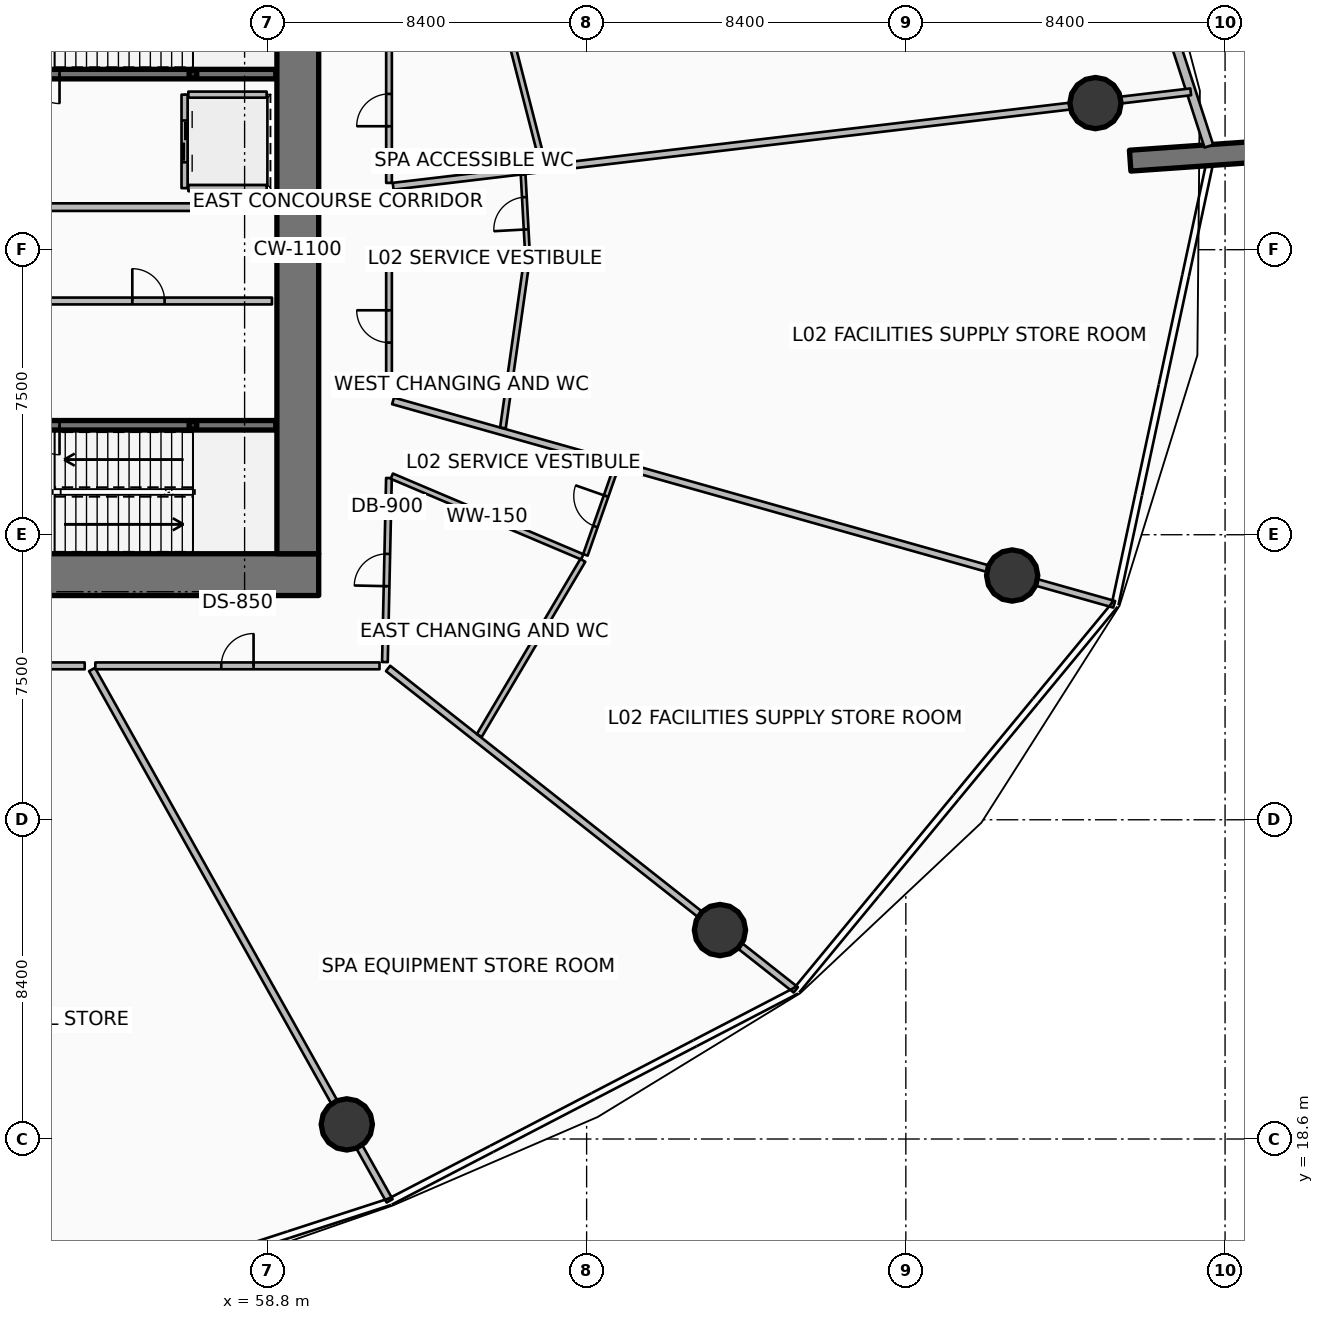
"""IFC4 building model, lengths in metres.
Left out: names, types, materials, properties, quantities, classifications, styles, units other than length and angle.
Written with IfcOpenShell. Run it as: python <this file> out.ifc"""

import sys

from ifc_helpers import new_model, si_unit, direction, frame, frame_2d, origin, origin_2d, place, context, subcontext, project, spatial, rectangle, hollow_rectangle, circle, extrude, element, fill, save


model = new_model("IFC4")
c1 = context("Model", 3, precision=1e-05, world=origin(), true_north=direction((0.0, 1.0)))
c2 = subcontext(c1, "Body", "Model", "MODEL_VIEW")
j1 = project(units=[si_unit("LENGTHUNIT", "METRE"), si_unit("PLANEANGLEUNIT", "RADIAN")], contexts=[c1])
p1 = place(None, origin())
s1 = spatial("IfcSite", under=j1, at=p1, CompositionType="ELEMENT")
p2 = place(p1, origin())
s2 = spatial("IfcBuilding", under=s1, at=p2, CompositionType="ELEMENT")
p3 = place(p2, frame((0.0, 0.0, 12.0)))
s3 = spatial("IfcBuildingStorey", under=s2, at=p3, CompositionType="ELEMENT", Elevation=12.0)
p4 = place(p3, frame((49.95, 33.45, 0.0), z_axis=(0.0, 0.0, 1.0), x_axis=(1.0, 0.0, 0.0)))
e1 = element("IfcWall", 1, at=p4, inside=s3, PredefinedType="SHEAR", context=c2, shape_type="SweptSolid", body=[
    extrude(rectangle(XDim=10.2, YDim=1.1, at=frame_2d((5.1, 0.0))), origin(), (0.0, 0.0, 1.0), 4.8),
])
p5 = place(p3, frame((59.6, 34.0, 0.0), z_axis=(0.0, 0.0, 1.0), x_axis=(0.0, 1.0, 0.0)))
e2 = element("IfcWall", 2, at=p5, inside=s3, PredefinedType="SHEAR", context=c2, shape_type="SweptSolid", body=[
    extrude(rectangle(XDim=16.0, YDim=1.1, at=frame_2d((8.0, 0.0))), origin(), (0.0, 0.0, 1.0), 4.8),
])
for number, where, z_axis, x_axis in (
    (3, (56.84, 46.62, 0.0), (0.0, 0.0, 1.0), (1.0, 0.0, 0.0)),
    (4, (56.84, 37.38, 0.0), (0.0, 0.0, 1.0), (1.0, 0.0, 0.0)),
):
    element("IfcColumn", number, at=place(p3, frame(where, z_axis=z_axis, x_axis=x_axis)), inside=s3, PredefinedType="COLUMN", context=c2, shape_type="SweptSolid", body=[
        extrude(hollow_rectangle(XDim=0.2, YDim=0.2, WallThickness=0.01, InnerFilletRadius=0.01, OuterFilletRadius=0.02, at=origin_2d()), origin(), (0.0, 0.0, 1.0), 2.195),
    ])
p6 = place(p3, frame((81.503, 44.343, 0.0), z_axis=(0.0, 0.0, 1.0), x_axis=(0.997564163539, 0.069754853754, 0.0)))
e5 = element("IfcWall", 5, at=p6, inside=s3, PredefinedType="SOLIDWALL", context=c2, shape_type="SweptSolid", body=[
    extrude(rectangle(XDim=3.5, YDim=0.55, at=frame_2d((1.75, 0.0))), origin(), (0.0, 0.0, 1.0), 4.8),
])
for number, where, z_axis, x_axis in (
    (6, (60.889, 18.984, 0.0), (0.0, 0.0, 1.0), (1.0, 0.0, 0.0)),
    (7, (70.709, 24.098, 0.0), (0.0, 0.0, 1.0), (1.0, 0.0, 0.0)),
    (8, (78.398, 33.427, 0.0), (0.0, 0.0, 1.0), (1.0, 0.0, 0.0)),
    (9, (80.59, 45.857, 0.0), (0.0, 0.0, 1.0), (1.0, 0.0, 0.0)),
):
    element("IfcColumn", number, at=place(p3, frame(where, z_axis=z_axis, x_axis=x_axis)), inside=s3, PredefinedType="COLUMN", context=c2, shape_type="SweptSolid", body=[
        extrude(circle(Radius=0.675, at=origin_2d()), origin(), (0.0, 0.0, 1.0), 4.48),
    ])
p7 = place(p3, frame((83.573, 44.725, 0.0), z_axis=(0.0, 0.0, 1.0), x_axis=(-0.309022005354, 0.951054888115, 0.0)))
e10 = element("IfcWall", 10, at=p7, inside=s3, PredefinedType="SOLIDWALL", context=c2, shape_type="SweptSolid", body=[
    extrude(rectangle(XDim=16.803, YDim=0.24, at=frame_2d((8.401, 0.0))), origin(), (0.0, 0.0, 1.0), 3.43),
])
p8 = place(p7, frame((7.201, 0.0, 0.85)))
e11 = element("IfcOpeningElement", 11, at=p8, cuts=e10, PredefinedType="OPENING", context=c2, shape_type="SweptSolid", body=[
    extrude(rectangle(XDim=2.4, YDim=2.1, at=frame_2d((1.2, 1.05))), frame((0.0, 0.13, 0.0), z_axis=(0.0, -1.0, 0.0), x_axis=(1.0, 0.0, 0.0)), (0.0, 0.0, 1.0), 0.26),
])
p9 = place(p3, frame((51.48, 46.62, 0.0), z_axis=(0.0, 0.0, 1.0), x_axis=(1.0, 0.0, 0.0)))
e12 = element("IfcWall", 12, at=p9, inside=s3, PredefinedType="SOLIDWALL", context=c2, shape_type="SweptSolid", body=[
    extrude(rectangle(XDim=7.54, YDim=0.25, at=frame_2d((3.77, 0.0))), origin(), (0.0, 0.0, 1.0), 4.48),
])
p10 = place(p9, frame((0.3, 0.0, 0.0)))
e13 = element("IfcOpeningElement", 13, at=p10, cuts=e12, PredefinedType="OPENING", context=c2, shape_type="SweptSolid", body=[
    extrude(rectangle(XDim=1.55, YDim=2.15, at=frame_2d((0.775, 1.075))), frame((0.0, 0.135, 0.0), z_axis=(0.0, -1.0, 0.0), x_axis=(1.0, 0.0, 0.0)), (0.0, 0.0, 1.0), 0.27),
])
p11 = place(p3, frame((51.48, 37.38, 0.0), z_axis=(0.0, 0.0, 1.0), x_axis=(1.0, 0.0, 0.0)))
e14 = element("IfcWall", 14, at=p11, inside=s3, PredefinedType="SOLIDWALL", context=c2, shape_type="SweptSolid", body=[
    extrude(rectangle(XDim=7.54, YDim=0.25, at=frame_2d((3.77, 0.0))), origin(), (0.0, 0.0, 1.0), 4.48),
])
p12 = place(p11, frame((0.3, 0.0, 0.0)))
e15 = element("IfcOpeningElement", 15, at=p12, cuts=e14, PredefinedType="OPENING", context=c2, shape_type="SweptSolid", body=[
    extrude(rectangle(XDim=1.55, YDim=2.15, at=frame_2d((0.775, 1.075))), frame((0.0, 0.135, 0.0), z_axis=(0.0, -1.0, 0.0), x_axis=(1.0, 0.0, 0.0)), (0.0, 0.0, 1.0), 0.27),
])
p13 = place(p3, frame((56.62, 46.08, 0.0), z_axis=(0.0, 0.0, 1.0), x_axis=(0.0, -1.0, 0.0)))
e16 = element("IfcWall", 16, at=p13, inside=s3, PredefinedType="PARTITIONING", context=c2, shape_type="SweptSolid", body=[
    extrude(rectangle(XDim=2.46, YDim=0.16, at=frame_2d((1.23, 0.0))), origin(), (0.0, 0.0, 1.0), 4.48),
])
p14 = place(p13, frame((0.68, 0.0, 0.0)))
e17 = element("IfcOpeningElement", 17, at=p14, cuts=e16, PredefinedType="OPENING", context=c2, shape_type="SweptSolid", body=[
    extrude(rectangle(XDim=1.1, YDim=2.1, at=frame_2d((0.55, 1.05))), frame((0.0, 0.09, 0.0), z_axis=(0.0, -1.0, 0.0), x_axis=(1.0, 0.0, 0.0)), (0.0, 0.0, 1.0), 0.18),
])
for number, where, z_axis, x_axis in (
    (18, (56.72, 46.08, 0.0), (0.0, 0.0, 1.0), (1.0, 0.0, 0.0)),
    (19, (56.72, 43.62, 0.0), (0.0, 0.0, 1.0), (1.0, 0.0, 0.0)),
):
    element("IfcWall", number, at=place(p3, frame(where, z_axis=z_axis, x_axis=x_axis)), inside=s3, PredefinedType="PARTITIONING", context=c2, shape_type="SweptSolid", body=[
        extrude(rectangle(XDim=2.06, YDim=0.16, at=frame_2d((1.03, 0.0))), origin(), (0.0, 0.0, 1.0), 4.48),
    ])
p15 = place(p3, frame((52.42, 40.65, 0.0), z_axis=(0.0, 0.0, 1.0), x_axis=(1.0, 0.0, 0.0)))
e20 = element("IfcWall", 20, at=p15, inside=s3, PredefinedType="PARTITIONING", context=c2, shape_type="SweptSolid", body=[
    extrude(rectangle(XDim=6.5, YDim=0.18, at=frame_2d((3.25, 0.0))), origin(), (0.0, 0.0, 1.0), 4.48),
])
p16 = place(p15, frame((2.825, 0.0, 0.0)))
e21 = element("IfcOpeningElement", 21, at=p16, cuts=e20, PredefinedType="OPENING", context=c2, shape_type="SweptSolid", body=[
    extrude(rectangle(XDim=0.85, YDim=2.06, at=frame_2d((0.425, 1.03))), frame((0.0, 0.1, 0.0), z_axis=(0.0, -1.0, 0.0), x_axis=(1.0, 0.0, 0.0)), (0.0, 0.0, 1.0), 0.2),
])
p17 = place(p3, frame((50.12, 43.12, 0.0), z_axis=(0.0, 0.0, 1.0), x_axis=(1.0, 0.0, 0.0)))
e22 = element("IfcWall", 22, at=p17, inside=s3, PredefinedType="PARTITIONING", context=c2, shape_type="SweptSolid", body=[
    extrude(rectangle(XDim=8.88, YDim=0.2, at=frame_2d((4.44, 0.0))), origin(), (0.0, 0.0, 1.0), 4.48),
])
p18 = place(p3, frame((49.436, 31.05, 0.0), z_axis=(0.0, 0.0, 1.0), x_axis=(1.0, 0.0, 0.0)))
e23 = element("IfcWall", 23, at=p18, inside=s3, PredefinedType="PARTITIONING", context=c2, shape_type="SweptSolid", body=[
    extrude(rectangle(XDim=4.556, YDim=0.18, at=frame_2d((2.278, 0.0))), origin(), (0.0, 0.0, 1.0), 3.693),
])
p19 = place(p18, frame((1.753, 0.0, 0.0)))
e24 = element("IfcOpeningElement", 24, at=p19, cuts=e23, PredefinedType="OPENING", context=c2, shape_type="SweptSolid", body=[
    extrude(rectangle(XDim=1.05, YDim=2.1, at=frame_2d((0.525, 1.05))), frame((0.0, 0.1, 0.0), z_axis=(0.0, -1.0, 0.0), x_axis=(1.0, 0.0, 0.0)), (0.0, 0.0, 1.0), 0.2),
])
p20 = place(p3, frame((54.186, 30.954, 0.0), z_axis=(0.0, 0.0, 1.0), x_axis=(0.48862053439, -0.872496403071, 0.0)))
e25 = element("IfcWall", 25, at=p20, inside=s3, PredefinedType="PARTITIONING", context=c2, shape_type="SweptSolid", body=[
    extrude(rectangle(XDim=16.024, YDim=0.18, at=frame_2d((8.012, 0.0))), origin(), (0.0, 0.0, 1.0), 3.693),
])
p21 = place(p3, frame((54.272, 31.05, 0.0), z_axis=(0.0, 0.0, 1.0), x_axis=(1.0, 0.0, 0.0)))
e26 = element("IfcWall", 26, at=p21, inside=s3, PredefinedType="PARTITIONING", context=c2, shape_type="SweptSolid", body=[
    extrude(rectangle(XDim=7.478, YDim=0.18, at=frame_2d((3.739, 0.0))), origin(), (0.0, 0.0, 1.0), 3.693),
])
p22 = place(p21, frame((3.314, 0.0, 0.0)))
e27 = element("IfcOpeningElement", 27, at=p22, cuts=e26, PredefinedType="OPENING", context=c2, shape_type="SweptSolid", body=[
    extrude(rectangle(XDim=0.85, YDim=2.06, at=frame_2d((0.425, 1.03))), frame((0.0, 0.1, 0.0), z_axis=(0.0, -1.0, 0.0), x_axis=(1.0, 0.0, 0.0)), (0.0, 0.0, 1.0), 0.2),
])
p23 = place(p3, frame((61.976, 30.982, 0.0), z_axis=(0.0, 0.0, 1.0), x_axis=(0.785315783489, -0.619095404766, 0.0)))
e28 = element("IfcWall", 28, at=p23, inside=s3, PredefinedType="PARTITIONING", context=c2, shape_type="SweptSolid", body=[
    extrude(rectangle(XDim=13.661, YDim=0.18, at=frame_2d((6.831, 0.0))), origin(), (0.0, 0.0, 1.0), 3.693),
])
p24 = place(p3, frame((61.892, 31.15, 0.0), z_axis=(0.0, 0.0, 1.0), x_axis=(0.021928973177, 0.999759531155, 0.0)))
e29 = element("IfcWall", 29, at=p24, inside=s3, PredefinedType="PARTITIONING", context=c2, shape_type="SweptSolid", body=[
    extrude(rectangle(XDim=4.843, YDim=0.15, at=frame_2d((2.421, 0.0))), origin(), (0.0, 0.0, 1.0), 3.693),
])
p25 = place(p24, frame((1.997, 0.0, 0.0)))
e30 = element("IfcOpeningElement", 30, at=p25, cuts=e29, PredefinedType="OPENING", context=c2, shape_type="SweptSolid", body=[
    extrude(rectangle(XDim=0.85, YDim=2.06, at=frame_2d((0.425, 1.03))), frame((0.0, 0.085, 0.0), z_axis=(0.0, -1.0, 0.0), x_axis=(1.0, 0.0, 0.0)), (0.0, 0.0, 1.0), 0.17),
])
p26 = place(p3, frame((62.074, 36.041, 0.0), z_axis=(0.0, 0.0, 1.0), x_axis=(0.920841540816, -0.38993699069, 0.0)))
e31 = element("IfcWall", 31, at=p26, inside=s3, PredefinedType="PARTITIONING", context=c2, shape_type="SweptSolid", body=[
    extrude(rectangle(XDim=5.443, YDim=0.15, at=frame_2d((2.722, 0.0))), origin(), (0.0, 0.0, 1.0), 3.92),
])
p27 = place(p3, frame((64.375, 29.217, 0.0), z_axis=(0.0, 0.0, 1.0), x_axis=(0.509047270842, 0.860738564286, 0.0)))
e32 = element("IfcWall", 32, at=p27, inside=s3, PredefinedType="PARTITIONING", context=c2, shape_type="SweptSolid", body=[
    extrude(rectangle(XDim=5.354, YDim=0.15, at=frame_2d((2.677, 0.0))), origin(), (0.0, 0.0, 1.0), 3.693),
])
p28 = place(p3, frame((67.168, 33.97, 0.0), z_axis=(0.0, 0.0, 1.0), x_axis=(0.331316814656, 0.943519564358, 0.0)))
e33 = element("IfcWall", 33, at=p28, inside=s3, PredefinedType="PARTITIONING", context=c2, shape_type="SweptSolid", body=[
    extrude(rectangle(XDim=2.43, YDim=0.125, at=frame_2d((1.215, 0.0))), origin(), (0.0, 0.0, 1.0), 3.693),
])
p29 = place(p28, frame((0.79, 0.0, 0.0)))
e34 = element("IfcOpeningElement", 34, at=p29, cuts=e33, PredefinedType="OPENING", context=c2, shape_type="SweptSolid", body=[
    extrude(rectangle(XDim=0.85, YDim=2.06, at=frame_2d((0.425, 1.03))), frame((0.0, 0.073, 0.0), z_axis=(0.0, -1.0, 0.0), x_axis=(1.0, 0.0, 0.0)), (0.0, 0.0, 1.0), 0.145),
])
p30 = place(p3, frame((62.106, 38.022, 0.0), z_axis=(0.0, 0.0, 1.0), x_axis=(0.962455233657, -0.271440459782, 0.0)))
e35 = element("IfcWall", 35, at=p30, inside=s3, PredefinedType="PARTITIONING", context=c2, shape_type="SweptSolid", body=[
    extrude(rectangle(XDim=19.716, YDim=0.18, at=frame_2d((9.858, 0.0))), origin(), (0.0, 0.0, 1.0), 3.693),
])
p31 = place(p3, frame((62.0, 38.152, 0.0), z_axis=(0.0, 0.0, 1.0), x_axis=(0.0, 1.0, 0.0)))
e36 = element("IfcWall", 36, at=p31, inside=s3, PredefinedType="PARTITIONING", context=c2, shape_type="SweptSolid", body=[
    extrude(rectangle(XDim=3.658, YDim=0.15, at=frame_2d((1.829, 0.0))), origin(), (0.0, 0.0, 1.0), 3.693),
])
p32 = place(p31, frame((1.404, 0.0, 0.0)))
e37 = element("IfcOpeningElement", 37, at=p32, cuts=e36, PredefinedType="OPENING", context=c2, shape_type="SweptSolid", body=[
    extrude(rectangle(XDim=0.85, YDim=2.06, at=frame_2d((0.425, 1.03))), frame((0.0, 0.085, 0.0), z_axis=(0.0, -1.0, 0.0), x_axis=(1.0, 0.0, 0.0)), (0.0, 0.0, 1.0), 0.17),
])
p33 = place(p3, frame((62.08, 41.889, 0.0), z_axis=(0.0, 0.0, 1.0), x_axis=(0.999969031596, -0.007869933178, 0.0)))
e38 = element("IfcWall", 38, at=p33, inside=s3, PredefinedType="PARTITIONING", context=c2, shape_type="SweptSolid", body=[
    extrude(rectangle(XDim=3.505, YDim=0.15, at=frame_2d((1.753, 0.0))), origin(), (0.0, 0.0, 1.0), 3.92),
])
p34 = place(p3, frame((64.998, 37.309, 0.0), z_axis=(0.0, 0.0, 1.0), x_axis=(0.140922059176, 0.990020693338, 0.0)))
e39 = element("IfcWall", 39, at=p34, inside=s3, PredefinedType="PARTITIONING", context=c2, shape_type="SweptSolid", body=[
    extrude(rectangle(XDim=4.518, YDim=0.15, at=frame_2d((2.259, 0.0))), origin(), (0.0, 0.0, 1.0), 3.693),
])
p35 = place(p3, frame((65.641, 41.941, 0.0), z_axis=(0.0, 0.0, 1.0), x_axis=(-0.054918793983, 0.998490824228, 0.0)))
e40 = element("IfcWall", 40, at=p35, inside=s3, PredefinedType="PARTITIONING", context=c2, shape_type="SweptSolid", body=[
    extrude(rectangle(XDim=2.036, YDim=0.125, at=frame_2d((1.018, 0.0))), origin(), (0.0, 0.0, 1.0), 3.693),
])
p36 = place(p35, frame((0.593, 0.0, 0.0)))
e41 = element("IfcOpeningElement", 41, at=p36, cuts=e40, PredefinedType="OPENING", context=c2, shape_type="SweptSolid", body=[
    extrude(rectangle(XDim=0.85, YDim=2.06, at=frame_2d((0.425, 1.03))), frame((0.0, 0.073, 0.0), z_axis=(0.0, -1.0, 0.0), x_axis=(1.0, 0.0, 0.0)), (0.0, 0.0, 1.0), 0.145),
])
p37 = place(p3, frame((62.109, 43.67, 0.0), z_axis=(0.0, 0.0, 1.0), x_axis=(0.993068665713, 0.117535633659, 0.0)))
e42 = element("IfcWall", 42, at=p37, inside=s3, PredefinedType="PARTITIONING", context=c2, shape_type="SweptSolid", body=[
    extrude(rectangle(XDim=21.133, YDim=0.18, at=frame_2d((10.566, 0.0))), origin(), (0.0, 0.0, 1.0), 3.693),
])
p38 = place(p3, frame((62.0, 43.757, 0.0), z_axis=(0.0, 0.0, 1.0), x_axis=(0.0, 1.0, 0.0)))
e43 = element("IfcWall", 43, at=p38, inside=s3, PredefinedType="PARTITIONING", context=c2, shape_type="SweptSolid", body=[
    extrude(rectangle(XDim=3.833, YDim=0.15, at=frame_2d((1.917, 0.0))), origin(), (0.0, 0.0, 1.0), 3.693),
])
p39 = place(p38, frame((1.492, 0.0, 0.0)))
e44 = element("IfcOpeningElement", 44, at=p39, cuts=e43, PredefinedType="OPENING", context=c2, shape_type="SweptSolid", body=[
    extrude(rectangle(XDim=0.85, YDim=2.06, at=frame_2d((0.425, 1.03))), frame((0.0, 0.085, 0.0), z_axis=(0.0, -1.0, 0.0), x_axis=(1.0, 0.0, 0.0)), (0.0, 0.0, 1.0), 0.17),
])
p40 = place(p3, frame((66.054, 44.237, 0.0), z_axis=(0.0, 0.0, 1.0), x_axis=(-0.248710144761, 0.968577959636, 0.0)))
e45 = element("IfcWall", 45, at=p40, inside=s3, PredefinedType="PARTITIONING", context=c2, shape_type="SweptSolid", body=[
    extrude(rectangle(XDim=4.667, YDim=0.15, at=frame_2d((2.333, 0.0))), origin(), (0.0, 0.0, 1.0), 3.693),
])
p41 = place(p10, origin())
e46 = element("IfcDoor", 46, at=p41, inside=s3, OperationType="DOUBLE_DOOR_SINGLE_SWING", PredefinedType="DOOR", context=c2, shape_type="SweptSolid", body=[
    extrude(rectangle(XDim=1.55, YDim=2.15, at=frame_2d((0.775, 1.075))), frame((0.0, 0.025, 0.0), z_axis=(0.0, -1.0, 0.0), x_axis=(1.0, 0.0, 0.0)), (0.0, 0.0, 1.0), 0.05),
])
fill(e13, e46)
p42 = place(p12, origin())
e47 = element("IfcDoor", 47, at=p42, inside=s3, OperationType="DOUBLE_DOOR_SINGLE_SWING", PredefinedType="DOOR", context=c2, shape_type="SweptSolid", body=[
    extrude(rectangle(XDim=1.55, YDim=2.15, at=frame_2d((0.775, 1.075))), frame((0.0, 0.025, 0.0), z_axis=(0.0, -1.0, 0.0), x_axis=(1.0, 0.0, 0.0)), (0.0, 0.0, 1.0), 0.05),
])
fill(e15, e47)
p43 = place(p14, origin())
e48 = element("IfcDoor", 48, at=p43, inside=s3, OperationType="DOUBLE_DOOR_SLIDING", PredefinedType="DOOR", context=c2, shape_type="SweptSolid", body=[
    extrude(rectangle(XDim=1.1, YDim=2.1, at=frame_2d((0.55, 1.05))), frame((0.0, 0.025, 0.0), z_axis=(0.0, -1.0, 0.0), x_axis=(1.0, 0.0, 0.0)), (0.0, 0.0, 1.0), 0.05),
])
fill(e17, e48)
p44 = place(p16, origin())
e49 = element("IfcDoor", 49, at=p44, inside=s3, OperationType="SINGLE_SWING_LEFT", PredefinedType="DOOR", context=c2, shape_type="SweptSolid", body=[
    extrude(rectangle(XDim=0.85, YDim=2.06, at=frame_2d((0.425, 1.03))), frame((0.0, 0.025, 0.0), z_axis=(0.0, -1.0, 0.0), x_axis=(1.0, 0.0, 0.0)), (0.0, 0.0, 1.0), 0.05),
])
fill(e21, e49)
p45 = place(p22, origin())
e50 = element("IfcDoor", 50, at=p45, inside=s3, OperationType="SINGLE_SWING_RIGHT", PredefinedType="DOOR", context=c2, shape_type="SweptSolid", body=[
    extrude(rectangle(XDim=0.85, YDim=2.06, at=frame_2d((0.425, 1.03))), frame((0.0, 0.025, 0.0), z_axis=(0.0, -1.0, 0.0), x_axis=(1.0, 0.0, 0.0)), (0.0, 0.0, 1.0), 0.05),
])
fill(e27, e50)
p46 = place(p25, origin())
e51 = element("IfcDoor", 51, at=p46, inside=s3, OperationType="SINGLE_SWING_LEFT", PredefinedType="DOOR", context=c2, shape_type="SweptSolid", body=[
    extrude(rectangle(XDim=0.85, YDim=2.06, at=frame_2d((0.425, 1.03))), frame((0.0, 0.025, 0.0), z_axis=(0.0, -1.0, 0.0), x_axis=(1.0, 0.0, 0.0)), (0.0, 0.0, 1.0), 0.05),
])
fill(e30, e51)
p47 = place(p29, origin())
e52 = element("IfcDoor", 52, at=p47, inside=s3, OperationType="SINGLE_SWING_RIGHT", PredefinedType="DOOR", context=c2, shape_type="SweptSolid", body=[
    extrude(rectangle(XDim=0.85, YDim=2.06, at=frame_2d((0.425, 1.03))), frame((0.0, 0.025, 0.0), z_axis=(0.0, -1.0, 0.0), x_axis=(1.0, 0.0, 0.0)), (0.0, 0.0, 1.0), 0.05),
])
fill(e34, e52)
p48 = place(p32, origin())
e53 = element("IfcDoor", 53, at=p48, inside=s3, OperationType="SINGLE_SWING_RIGHT", PredefinedType="DOOR", context=c2, shape_type="SweptSolid", body=[
    extrude(rectangle(XDim=0.85, YDim=2.06, at=frame_2d((0.425, 1.03))), frame((0.0, 0.025, 0.0), z_axis=(0.0, -1.0, 0.0), x_axis=(1.0, 0.0, 0.0)), (0.0, 0.0, 1.0), 0.05),
])
fill(e37, e53)
p49 = place(p36, origin())
e54 = element("IfcDoor", 54, at=p49, inside=s3, OperationType="SINGLE_SWING_LEFT", PredefinedType="DOOR", context=c2, shape_type="SweptSolid", body=[
    extrude(rectangle(XDim=0.85, YDim=2.06, at=frame_2d((0.425, 1.03))), frame((0.0, 0.025, 0.0), z_axis=(0.0, -1.0, 0.0), x_axis=(1.0, 0.0, 0.0)), (0.0, 0.0, 1.0), 0.05),
])
fill(e41, e54)
p50 = place(p39, origin())
e55 = element("IfcDoor", 55, at=p50, inside=s3, OperationType="SINGLE_SWING_LEFT", PredefinedType="DOOR", context=c2, shape_type="SweptSolid", body=[
    extrude(rectangle(XDim=0.85, YDim=2.06, at=frame_2d((0.425, 1.03))), frame((0.0, 0.025, 0.0), z_axis=(0.0, -1.0, 0.0), x_axis=(1.0, 0.0, 0.0)), (0.0, 0.0, 1.0), 0.05),
])
fill(e44, e55)
save(model, sys.argv[1])
